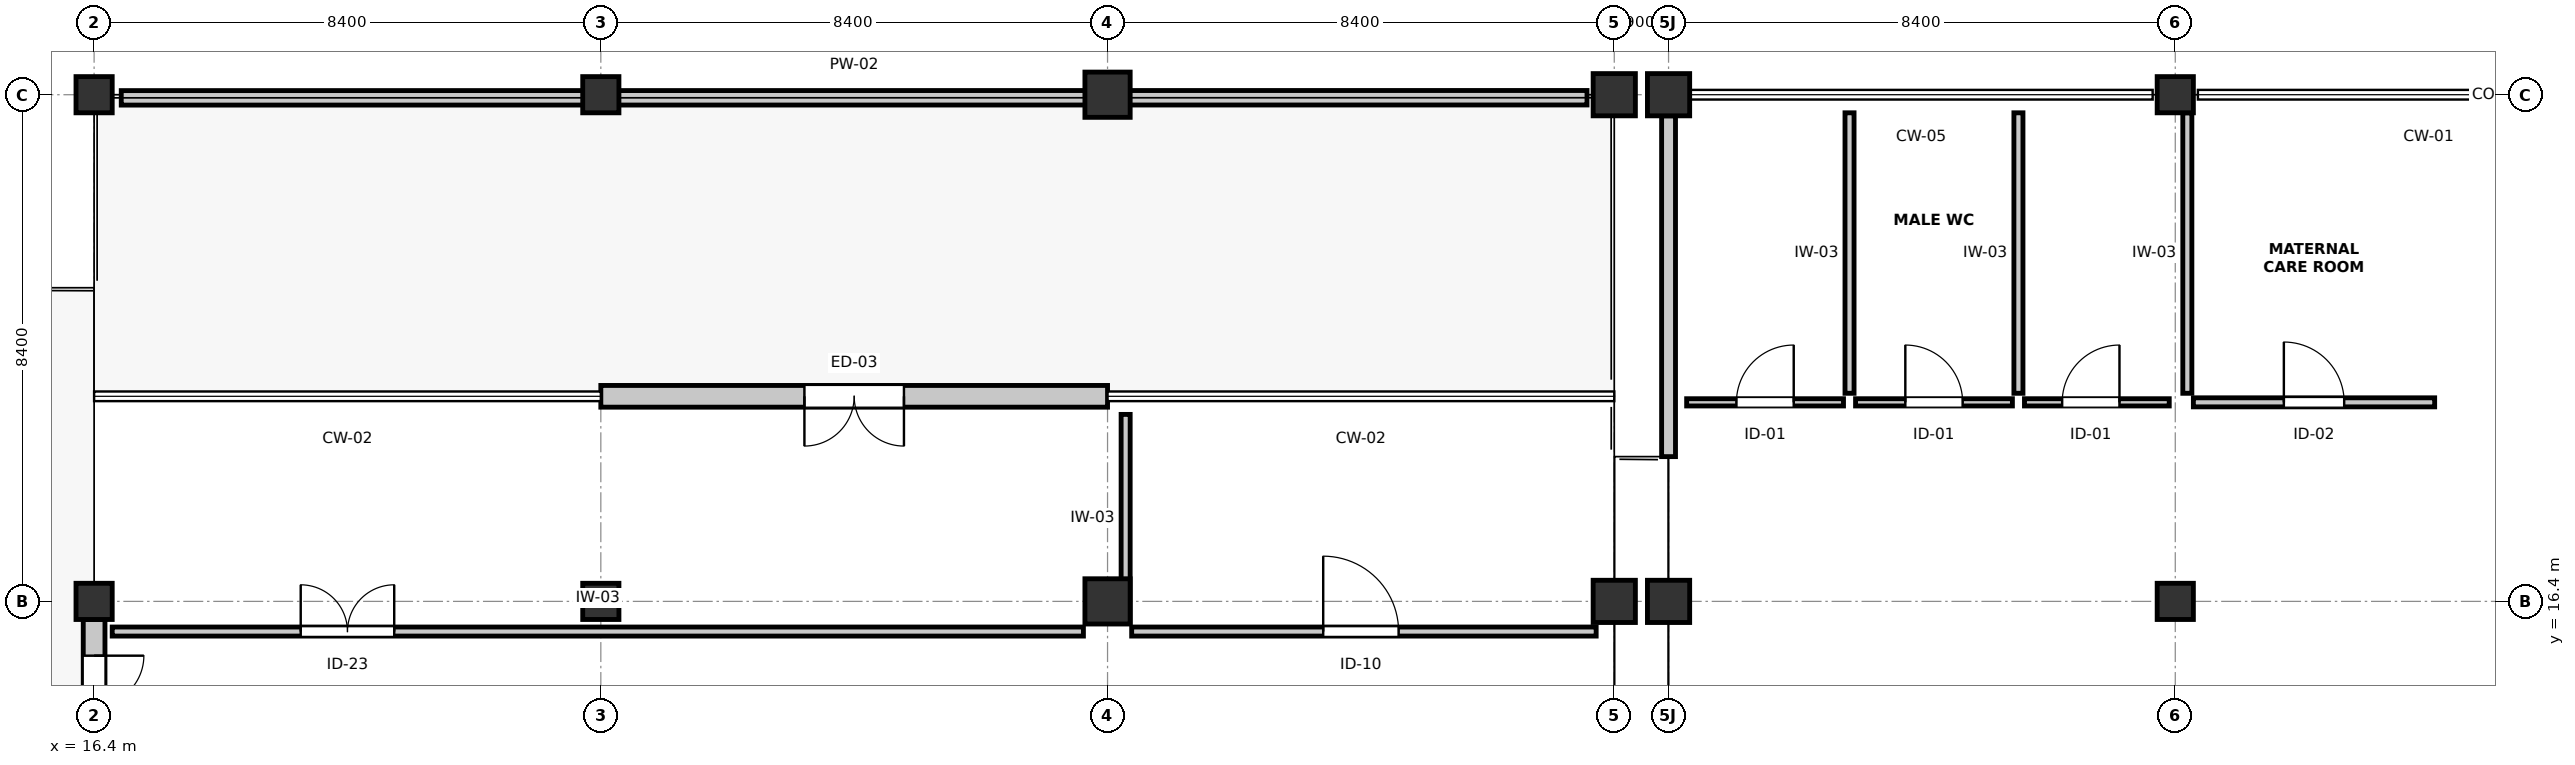
"""IFC4 building model, lengths in metres.
Left out: names, types, materials, properties, quantities, classifications, styles, units other than length and angle.
Written with IfcOpenShell. Run it as: python <this file> out.ifc"""

import sys

from ifc_helpers import new_model, si_unit, direction, frame, frame_2d, origin, origin_2d, place, context, subcontext, project, spatial, rectangle, circle, extrude, element, fill, save


model = new_model("IFC4")
c1 = context("Model", 3, precision=1e-05, world=origin(), true_north=direction((0.0, 1.0)))
c2 = subcontext(c1, "Body", "Model", "MODEL_VIEW")
j1 = project(units=[si_unit("LENGTHUNIT", "METRE"), si_unit("PLANEANGLEUNIT", "RADIAN")], contexts=[c1])
p1 = place(None, origin())
s1 = spatial("IfcSite", under=j1, at=p1, CompositionType="ELEMENT")
p2 = place(p1, origin())
s2 = spatial("IfcBuilding", under=s1, at=p2, CompositionType="ELEMENT")
p3 = place(p2, frame((0.0, 0.0, 4.8)))
s3 = spatial("IfcBuildingStorey", under=s2, at=p3, CompositionType="ELEMENT", Elevation=4.8)
for number, where, z_axis, x_axis in (
    (1, (16.4, 16.4, 0.0), (0.0, 0.0, 1.0), (1.0, 0.0, 0.0)),
    (2, (16.4, 24.8, 0.0), (0.0, 0.0, 1.0), (1.0, 0.0, 0.0)),
):
    element("IfcColumn", number, at=place(p3, frame(where, z_axis=z_axis, x_axis=x_axis)), inside=s3, PredefinedType="COLUMN", context=c2, shape_type="SweptSolid", body=[
        extrude(rectangle(XDim=0.6, YDim=0.6, at=origin_2d()), origin(), (0.0, 0.0, 1.0), 4.8),
    ])
for number, where, z_axis, x_axis in (
    (3, (24.8, 16.4, 0.0), (0.0, 0.0, 1.0), (1.0, 0.0, 0.0)),
    (4, (24.8, 24.8, 0.0), (0.0, 0.0, 1.0), (1.0, 0.0, 0.0)),
):
    element("IfcColumn", number, at=place(p3, frame(where, z_axis=z_axis, x_axis=x_axis)), inside=s3, PredefinedType="COLUMN", context=c2, shape_type="SweptSolid", body=[
        extrude(circle(Radius=0.375, at=origin_2d()), origin(), (0.0, 0.0, 1.0), 4.8),
    ])
for number, where, z_axis, x_axis in (
    (5, (33.2, 16.4, 0.0), (0.0, 0.0, 1.0), (1.0, 0.0, 0.0)),
    (6, (33.2, 24.8, 0.0), (0.0, 0.0, 1.0), (1.0, 0.0, 0.0)),
):
    element("IfcColumn", number, at=place(p3, frame(where, z_axis=z_axis, x_axis=x_axis)), inside=s3, PredefinedType="COLUMN", context=c2, shape_type="SweptSolid", body=[
        extrude(rectangle(XDim=0.75, YDim=0.75, at=origin_2d()), origin(), (0.0, 0.0, 1.0), 4.8),
    ])
for number, where, z_axis, x_axis in (
    (7, (41.6, 16.4, 0.0), (0.0, 0.0, 1.0), (1.0, 0.0, 0.0)),
    (8, (41.6, 24.8, 0.0), (0.0, 0.0, 1.0), (1.0, 0.0, 0.0)),
    (9, (42.5, 16.4, 0.0), (0.0, 0.0, 1.0), (1.0, 0.0, 0.0)),
    (10, (42.5, 24.8, 0.0), (0.0, 0.0, 1.0), (1.0, 0.0, 0.0)),
):
    element("IfcColumn", number, at=place(p3, frame(where, z_axis=z_axis, x_axis=x_axis)), inside=s3, PredefinedType="COLUMN", context=c2, shape_type="SweptSolid", body=[
        extrude(rectangle(XDim=0.7, YDim=0.7, at=origin_2d()), origin(), (0.0, 0.0, 1.0), 4.8),
    ])
for number, where, z_axis, x_axis in (
    (11, (50.9, 16.4, 0.0), (0.0, 0.0, 1.0), (1.0, 0.0, 0.0)),
    (12, (50.9, 24.8, 0.0), (0.0, 0.0, 1.0), (1.0, 0.0, 0.0)),
):
    element("IfcColumn", number, at=place(p3, frame(where, z_axis=z_axis, x_axis=x_axis)), inside=s3, PredefinedType="COLUMN", context=c2, shape_type="SweptSolid", body=[
        extrude(circle(Radius=0.375, at=origin_2d()), origin(), (0.0, 0.0, 1.0), 4.8),
    ])
p4 = place(p3, frame((33.2, 19.8, 0.0), z_axis=(0.0, 0.0, 1.0), x_axis=(-1.0, 0.0, 0.0)))
e13 = element("IfcWall", 13, at=p4, inside=s3, PredefinedType="STANDARD", context=c2, shape_type="SweptSolid", body=[
    extrude(rectangle(XDim=8.4, YDim=0.36, at=frame_2d((4.2, 0.0))), origin(), (0.0, 0.0, 1.0), 3.785),
])
p5 = place(p4, frame((3.375, 0.0, 0.0)))
e14 = element("IfcOpeningElement", 14, at=p5, cuts=e13, PredefinedType="OPENING", context=c2, shape_type="SweptSolid", body=[
    extrude(rectangle(XDim=1.65, YDim=2.25, at=frame_2d((0.825, 1.125))), frame((0.0, 0.19, 0.0), z_axis=(0.0, -1.0, 0.0), x_axis=(1.0, 0.0, 0.0)), (0.0, 0.0, 1.0), 0.38),
])
p6 = place(p3, frame((16.4, 16.1, 0.0), z_axis=(0.0, 0.0, 1.0), x_axis=(0.0, -1.0, 0.0)))
e15 = element("IfcWall", 15, at=p6, inside=s3, PredefinedType="STANDARD", context=c2, shape_type="SweptSolid", body=[
    extrude(rectangle(XDim=7.8, YDim=0.36, at=frame_2d((3.9, 0.0))), origin(), (0.0, 0.0, 1.0), 3.745),
])
p7 = place(p6, frame((0.6, 0.0, 0.0)))
e16 = element("IfcOpeningElement", 16, at=p7, cuts=e15, PredefinedType="OPENING", context=c2, shape_type="SweptSolid", body=[
    extrude(rectangle(XDim=1.65, YDim=2.25, at=frame_2d((0.825, 1.125))), frame((0.0, 0.19, 0.0), z_axis=(0.0, -1.0, 0.0), x_axis=(1.0, 0.0, 0.0)), (0.0, 0.0, 1.0), 0.38),
])
p8 = place(p3, frame((42.5, 18.8, 0.0), z_axis=(0.0, 0.0, 1.0), x_axis=(0.0, 1.0, 0.0)))
e17 = element("IfcWall", 17, at=p8, inside=s3, PredefinedType="STANDARD", context=c2, shape_type="SweptSolid", body=[
    extrude(rectangle(XDim=5.65, YDim=0.23, at=frame_2d((2.825, 0.0))), origin(), (0.0, 0.0, 1.0), 3.715),
])
p9 = place(p3, frame((16.85, 24.748, 0.0), z_axis=(0.0, 0.0, 1.0), x_axis=(0.999999996769, 8.0382621e-05, 0.0)))
e18 = element("IfcWall", 18, at=p9, inside=s3, PredefinedType="PARAPET", context=c2, shape_type="SweptSolid", body=[
    extrude(rectangle(XDim=24.298, YDim=0.24, at=frame_2d((12.149, 0.0))), origin(), (0.0, 0.0, 1.0), 0.34),
])
p10 = place(p3, frame((16.7, 15.9, 0.0), z_axis=(0.0, 0.0, 1.0), x_axis=(1.0, 0.0, 0.0)))
e19 = element("IfcWall", 19, at=p10, inside=s3, PredefinedType="PARTITIONING", context=c2, shape_type="SweptSolid", body=[
    extrude(rectangle(XDim=16.1, YDim=0.15, at=frame_2d((8.05, 0.0))), origin(), (0.0, 0.0, 1.0), 4.535),
])
p11 = place(p10, frame((3.125, 0.0, 0.0)))
e20 = element("IfcOpeningElement", 20, at=p11, cuts=e19, PredefinedType="OPENING", context=c2, shape_type="SweptSolid", body=[
    extrude(rectangle(XDim=1.55, YDim=2.26, at=frame_2d((0.775, 1.13))), frame((0.0, 0.085, 0.0), z_axis=(0.0, -1.0, 0.0), x_axis=(1.0, 0.0, 0.0)), (0.0, 0.0, 1.0), 0.17),
])
p12 = place(p3, frame((33.6, 15.9, 0.0), z_axis=(0.0, 0.0, 1.0), x_axis=(1.0, 0.0, 0.0)))
e21 = element("IfcWall", 21, at=p12, inside=s3, PredefinedType="PARTITIONING", context=c2, shape_type="SweptSolid", body=[
    extrude(rectangle(XDim=7.7, YDim=0.15, at=frame_2d((3.85, 0.0))), origin(), (0.0, 0.0, 1.0), 4.535),
])
p13 = place(p12, frame((3.175, 0.0, 0.0)))
e22 = element("IfcOpeningElement", 22, at=p13, cuts=e21, PredefinedType="OPENING", context=c2, shape_type="SweptSolid", body=[
    extrude(rectangle(XDim=1.25, YDim=2.16, at=frame_2d((0.625, 1.08))), frame((0.0, 0.085, 0.0), z_axis=(0.0, -1.0, 0.0), x_axis=(1.0, 0.0, 0.0)), (0.0, 0.0, 1.0), 0.17),
])
p14 = place(p3, frame((33.5, 16.05, 0.0), z_axis=(0.0, 0.0, 1.0), x_axis=(0.0, 1.0, 0.0)))
e23 = element("IfcWall", 23, at=p14, inside=s3, PredefinedType="PARTITIONING", context=c2, shape_type="SweptSolid", body=[
    extrude(rectangle(XDim=3.45, YDim=0.15, at=frame_2d((1.725, 0.0))), origin(), (0.0, 0.0, 1.0), 3.645),
])
p15 = place(p3, frame((42.8, 19.7, 0.0), z_axis=(0.0, 0.0, 1.0), x_axis=(1.0, 0.0, 0.0)))
e24 = element("IfcWall", 24, at=p15, inside=s3, PredefinedType="PARTITIONING", context=c2, shape_type="SweptSolid", body=[
    extrude(rectangle(XDim=2.6, YDim=0.12, at=frame_2d((1.3, 0.0))), origin(), (0.0, 0.0, 1.0), 4.535),
])
p16 = place(p15, frame((0.825, 0.0, 0.0)))
e25 = element("IfcOpeningElement", 25, at=p16, cuts=e24, PredefinedType="OPENING", context=c2, shape_type="SweptSolid", body=[
    extrude(rectangle(XDim=0.95, YDim=2.12, at=frame_2d((0.475, 1.06))), frame((0.0, 0.07, 0.0), z_axis=(0.0, -1.0, 0.0), x_axis=(1.0, 0.0, 0.0)), (0.0, 0.0, 1.0), 0.14),
])
p17 = place(p3, frame((45.6, 19.7, 0.0), z_axis=(0.0, 0.0, 1.0), x_axis=(1.0, 0.0, 0.0)))
e26 = element("IfcWall", 26, at=p17, inside=s3, PredefinedType="PARTITIONING", context=c2, shape_type="SweptSolid", body=[
    extrude(rectangle(XDim=2.6, YDim=0.12, at=frame_2d((1.3, 0.0))), origin(), (0.0, 0.0, 1.0), 4.535),
])
p18 = place(p17, frame((0.825, 0.0, 0.0)))
e27 = element("IfcOpeningElement", 27, at=p18, cuts=e26, PredefinedType="OPENING", context=c2, shape_type="SweptSolid", body=[
    extrude(rectangle(XDim=0.95, YDim=2.12, at=frame_2d((0.475, 1.06))), frame((0.0, 0.07, 0.0), z_axis=(0.0, -1.0, 0.0), x_axis=(1.0, 0.0, 0.0)), (0.0, 0.0, 1.0), 0.14),
])
p19 = place(p3, frame((45.5, 19.85, 0.0), z_axis=(0.0, 0.0, 1.0), x_axis=(0.0, 1.0, 0.0)))
e28 = element("IfcWall", 28, at=p19, inside=s3, PredefinedType="PARTITIONING", context=c2, shape_type="SweptSolid", body=[
    extrude(rectangle(XDim=4.65, YDim=0.15, at=frame_2d((2.325, 0.0))), origin(), (0.0, 0.0, 1.0), 4.065),
])
p20 = place(p3, frame((48.4, 19.7, 0.0), z_axis=(0.0, 0.0, 1.0), x_axis=(1.0, 0.0, 0.0)))
e29 = element("IfcWall", 29, at=p20, inside=s3, PredefinedType="PARTITIONING", context=c2, shape_type="SweptSolid", body=[
    extrude(rectangle(XDim=2.4, YDim=0.12, at=frame_2d((1.2, 0.0))), origin(), (0.0, 0.0, 1.0), 3.715),
])
p21 = place(p20, frame((0.625, 0.0, 0.0)))
e30 = element("IfcOpeningElement", 30, at=p21, cuts=e29, PredefinedType="OPENING", context=c2, shape_type="SweptSolid", body=[
    extrude(rectangle(XDim=0.95, YDim=2.12, at=frame_2d((0.475, 1.06))), frame((0.0, 0.07, 0.0), z_axis=(0.0, -1.0, 0.0), x_axis=(1.0, 0.0, 0.0)), (0.0, 0.0, 1.0), 0.14),
])
p22 = place(p3, frame((48.3, 19.85, 0.0), z_axis=(0.0, 0.0, 1.0), x_axis=(0.0, 1.0, 0.0)))
e31 = element("IfcWall", 31, at=p22, inside=s3, PredefinedType="PARTITIONING", context=c2, shape_type="SweptSolid", body=[
    extrude(rectangle(XDim=4.65, YDim=0.15, at=frame_2d((2.325, 0.0))), origin(), (0.0, 0.0, 1.0), 4.065),
])
p23 = place(p3, frame((51.2, 19.7, 0.0), z_axis=(0.0, 0.0, 1.0), x_axis=(1.0, 0.0, 0.0)))
e32 = element("IfcWall", 32, at=p23, inside=s3, PredefinedType="PARTITIONING", context=c2, shape_type="SweptSolid", body=[
    extrude(rectangle(XDim=4.0, YDim=0.15, at=frame_2d((2.0, 0.0))), origin(), (0.0, 0.0, 1.0), 4.535),
])
p24 = place(p23, frame((1.5, 0.0, 0.0)))
e33 = element("IfcOpeningElement", 33, at=p24, cuts=e32, PredefinedType="OPENING", context=c2, shape_type="SweptSolid", body=[
    extrude(rectangle(XDim=1.0, YDim=2.14, at=frame_2d((0.5, 1.07))), frame((0.0, 0.085, 0.0), z_axis=(0.0, -1.0, 0.0), x_axis=(1.0, 0.0, 0.0)), (0.0, 0.0, 1.0), 0.17),
])
p25 = place(p3, frame((51.1, 19.85, 0.0), z_axis=(0.0, 0.0, 1.0), x_axis=(0.0, 1.0, 0.0)))
e34 = element("IfcWall", 34, at=p25, inside=s3, PredefinedType="PARTITIONING", context=c2, shape_type="SweptSolid", body=[
    extrude(rectangle(XDim=4.65, YDim=0.15, at=frame_2d((2.325, 0.0))), origin(), (0.0, 0.0, 1.0), 3.715),
])
p26 = place(p5, origin())
e35 = element("IfcDoor", 35, at=p26, inside=s3, OperationType="DOUBLE_DOOR_SINGLE_SWING", PredefinedType="DOOR", context=c2, shape_type="SweptSolid", body=[
    extrude(rectangle(XDim=1.65, YDim=2.25, at=frame_2d((0.825, 1.125))), frame((0.0, 0.025, 0.0), z_axis=(0.0, -1.0, 0.0), x_axis=(1.0, 0.0, 0.0)), (0.0, 0.0, 1.0), 0.05),
])
fill(e14, e35)
p27 = place(p7, origin())
e36 = element("IfcDoor", 36, at=p27, inside=s3, OperationType="DOUBLE_DOOR_SINGLE_SWING", PredefinedType="DOOR", context=c2, shape_type="SweptSolid", body=[
    extrude(rectangle(XDim=1.65, YDim=2.25, at=frame_2d((0.825, 1.125))), frame((0.0, 0.025, 0.0), z_axis=(0.0, -1.0, 0.0), x_axis=(1.0, 0.0, 0.0)), (0.0, 0.0, 1.0), 0.05),
])
fill(e16, e36)
p28 = place(p11, origin())
e37 = element("IfcDoor", 37, at=p28, inside=s3, OperationType="DOUBLE_DOOR_SINGLE_SWING", PredefinedType="DOOR", context=c2, shape_type="SweptSolid", body=[
    extrude(rectangle(XDim=1.55, YDim=2.26, at=frame_2d((0.775, 1.13))), frame((0.0, 0.025, 0.0), z_axis=(0.0, -1.0, 0.0), x_axis=(1.0, 0.0, 0.0)), (0.0, 0.0, 1.0), 0.05),
])
fill(e20, e37)
p29 = place(p13, origin())
e38 = element("IfcDoor", 38, at=p29, inside=s3, OperationType="SINGLE_SWING_LEFT", PredefinedType="DOOR", context=c2, shape_type="SweptSolid", body=[
    extrude(rectangle(XDim=1.25, YDim=2.16, at=frame_2d((0.625, 1.08))), frame((0.0, 0.025, 0.0), z_axis=(0.0, -1.0, 0.0), x_axis=(1.0, 0.0, 0.0)), (0.0, 0.0, 1.0), 0.05),
])
fill(e22, e38)
p30 = place(p16, origin())
e39 = element("IfcDoor", 39, at=p30, inside=s3, OperationType="SINGLE_SWING_RIGHT", PredefinedType="DOOR", context=c2, shape_type="SweptSolid", body=[
    extrude(rectangle(XDim=0.95, YDim=2.12, at=frame_2d((0.475, 1.06))), frame((0.0, 0.025, 0.0), z_axis=(0.0, -1.0, 0.0), x_axis=(1.0, 0.0, 0.0)), (0.0, 0.0, 1.0), 0.05),
])
fill(e25, e39)
p31 = place(p18, origin())
e40 = element("IfcDoor", 40, at=p31, inside=s3, OperationType="SINGLE_SWING_LEFT", PredefinedType="DOOR", context=c2, shape_type="SweptSolid", body=[
    extrude(rectangle(XDim=0.95, YDim=2.12, at=frame_2d((0.475, 1.06))), frame((0.0, 0.025, 0.0), z_axis=(0.0, -1.0, 0.0), x_axis=(1.0, 0.0, 0.0)), (0.0, 0.0, 1.0), 0.05),
])
fill(e27, e40)
p32 = place(p21, origin())
e41 = element("IfcDoor", 41, at=p32, inside=s3, OperationType="SINGLE_SWING_RIGHT", PredefinedType="DOOR", context=c2, shape_type="SweptSolid", body=[
    extrude(rectangle(XDim=0.95, YDim=2.12, at=frame_2d((0.475, 1.06))), frame((0.0, 0.025, 0.0), z_axis=(0.0, -1.0, 0.0), x_axis=(1.0, 0.0, 0.0)), (0.0, 0.0, 1.0), 0.05),
])
fill(e30, e41)
p33 = place(p24, origin())
e42 = element("IfcDoor", 42, at=p33, inside=s3, OperationType="SINGLE_SWING_LEFT", PredefinedType="DOOR", context=c2, shape_type="SweptSolid", body=[
    extrude(rectangle(XDim=1.0, YDim=2.14, at=frame_2d((0.5, 1.07))), frame((0.0, 0.025, 0.0), z_axis=(0.0, -1.0, 0.0), x_axis=(1.0, 0.0, 0.0)), (0.0, 0.0, 1.0), 0.05),
])
fill(e33, e42)
save(model, sys.argv[1])
